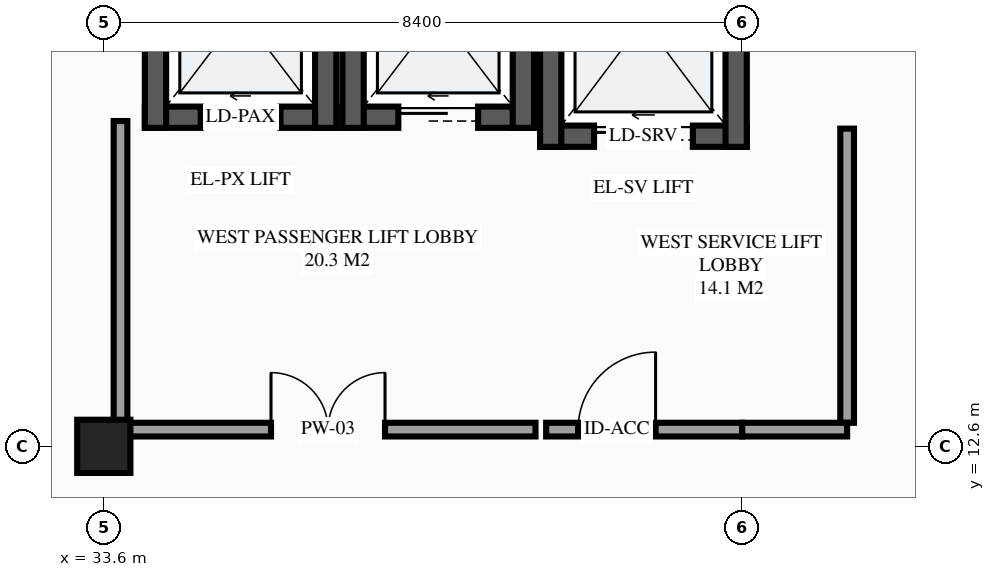
"""IFC4 building model, lengths in metres.
Left out: names, types, materials, properties, quantities, classifications, styles, units other than length and angle.
Written with IfcOpenShell. Run it as: python <this file> out.ifc"""

import sys

from ifc_helpers import new_model, si_unit, direction, frame, frame_2d, origin, origin_2d, place, context, subcontext, project, spatial, rectangle, extrude, element, fill, save


model = new_model("IFC4")
c1 = context("Model", 3, precision=1e-05, world=origin(), true_north=direction((0.0, 1.0)))
c2 = subcontext(c1, "Body", "Model", "MODEL_VIEW")
j1 = project(units=[si_unit("LENGTHUNIT", "METRE"), si_unit("PLANEANGLEUNIT", "RADIAN")], contexts=[c1])
p1 = place(None, origin())
s1 = spatial("IfcSite", under=j1, at=p1, CompositionType="ELEMENT")
p2 = place(p1, origin())
s2 = spatial("IfcBuilding", under=s1, at=p2, CompositionType="ELEMENT")
p3 = place(p2, frame((0.0, 0.0, 14.1)))
s3 = spatial("IfcBuildingStorey", under=s2, at=p3, CompositionType="ELEMENT", Elevation=14.1)
p4 = place(p3, frame((33.6, 12.6, 0.0), z_axis=(0.0, 0.0, 1.0), x_axis=(1.0, 0.0, 0.0)))
e1 = element("IfcColumn", 1, at=p4, inside=s3, PredefinedType="COLUMN", context=c2, shape_type="SweptSolid", body=[
    extrude(rectangle(XDim=0.7, YDim=0.7, at=origin_2d()), origin(), (0.0, 0.0, 1.0), 4.2),
])
p5 = place(p3, frame((34.14, 16.93, 0.0), z_axis=(0.0, 0.0, 1.0), x_axis=(1.0, 0.0, 0.0)))
e2 = element("IfcWall", 2, at=p5, inside=s3, PredefinedType="SHEAR", context=c2, shape_type="SweptSolid", body=[
    extrude(rectangle(XDim=2.52, YDim=0.28, at=frame_2d((1.26, 0.0))), origin(), (0.0, 0.0, 1.0), 4.2),
])
p6 = place(p5, frame((0.735, 0.0, 0.0)))
e3 = element("IfcOpeningElement", 3, at=p6, cuts=e2, PredefinedType="OPENING", context=c2, shape_type="SweptSolid", body=[
    extrude(rectangle(XDim=1.05, YDim=2.2, at=frame_2d((0.525, 1.1))), frame((0.0, 0.15, 0.0), z_axis=(0.0, -1.0, 0.0), x_axis=(1.0, 0.0, 0.0)), (0.0, 0.0, 1.0), 0.3),
])
for number, where, z_axis, x_axis in (
    (4, (36.52, 16.79, 0.0), (0.0, 0.0, 1.0), (0.0, 1.0, 0.0)),
    (5, (34.28, 19.81, 0.0), (0.0, 0.0, 1.0), (0.0, -1.0, 0.0)),
):
    element("IfcWall", number, at=place(p3, frame(where, z_axis=z_axis, x_axis=x_axis)), inside=s3, PredefinedType="SHEAR", context=c2, shape_type="SweptSolid", body=[
        extrude(rectangle(XDim=3.02, YDim=0.28, at=frame_2d((1.51, 0.0))), origin(), (0.0, 0.0, 1.0), 4.2),
    ])
p7 = place(p3, frame((36.74, 16.93, 0.0), z_axis=(0.0, 0.0, 1.0), x_axis=(1.0, 0.0, 0.0)))
e6 = element("IfcWall", 6, at=p7, inside=s3, PredefinedType="SHEAR", context=c2, shape_type="SweptSolid", body=[
    extrude(rectangle(XDim=2.52, YDim=0.28, at=frame_2d((1.26, 0.0))), origin(), (0.0, 0.0, 1.0), 4.2),
])
p8 = place(p7, frame((0.735, 0.0, 0.0)))
e7 = element("IfcOpeningElement", 7, at=p8, cuts=e6, PredefinedType="OPENING", context=c2, shape_type="SweptSolid", body=[
    extrude(rectangle(XDim=1.05, YDim=2.2, at=frame_2d((0.525, 1.1))), frame((0.0, 0.15, 0.0), z_axis=(0.0, -1.0, 0.0), x_axis=(1.0, 0.0, 0.0)), (0.0, 0.0, 1.0), 0.3),
])
for number, where, z_axis, x_axis in (
    (8, (39.12, 16.79, 0.0), (0.0, 0.0, 1.0), (0.0, 1.0, 0.0)),
    (9, (36.88, 19.81, 0.0), (0.0, 0.0, 1.0), (0.0, -1.0, 0.0)),
):
    element("IfcWall", number, at=place(p3, frame(where, z_axis=z_axis, x_axis=x_axis)), inside=s3, PredefinedType="SHEAR", context=c2, shape_type="SweptSolid", body=[
        extrude(rectangle(XDim=3.02, YDim=0.28, at=frame_2d((1.51, 0.0))), origin(), (0.0, 0.0, 1.0), 4.2),
    ])
p9 = place(p3, frame((39.34, 16.68, 0.0), z_axis=(0.0, 0.0, 1.0), x_axis=(1.0, 0.0, 0.0)))
e10 = element("IfcWall", 10, at=p9, inside=s3, PredefinedType="SHEAR", context=c2, shape_type="SweptSolid", body=[
    extrude(rectangle(XDim=2.72, YDim=0.28, at=frame_2d((1.36, 0.0))), origin(), (0.0, 0.0, 1.0), 4.2),
])
p10 = place(p9, frame((0.71, 0.0, 0.0)))
e11 = element("IfcOpeningElement", 11, at=p10, cuts=e10, PredefinedType="OPENING", context=c2, shape_type="SweptSolid", body=[
    extrude(rectangle(XDim=1.3, YDim=2.25, at=frame_2d((0.65, 1.125))), frame((0.0, 0.15, 0.0), z_axis=(0.0, -1.0, 0.0), x_axis=(1.0, 0.0, 0.0)), (0.0, 0.0, 1.0), 0.3),
])
for number, where, z_axis, x_axis in (
    (12, (41.92, 16.54, 0.0), (0.0, 0.0, 1.0), (0.0, 1.0, 0.0)),
    (13, (39.48, 19.86, 0.0), (0.0, 0.0, 1.0), (0.0, -1.0, 0.0)),
):
    element("IfcWall", number, at=place(p3, frame(where, z_axis=z_axis, x_axis=x_axis)), inside=s3, PredefinedType="SHEAR", context=c2, shape_type="SweptSolid", body=[
        extrude(rectangle(XDim=3.32, YDim=0.28, at=frame_2d((1.66, 0.0))), origin(), (0.0, 0.0, 1.0), 4.2),
    ])
p11 = place(p3, frame((33.82, 12.82, 0.0), z_axis=(0.0, 0.0, 1.0), x_axis=(1.0, 0.0, 0.0)))
e14 = element("IfcWall", 14, at=p11, inside=s3, PredefinedType="PARTITIONING", context=c2, shape_type="SweptSolid", body=[
    extrude(rectangle(XDim=5.46, YDim=0.18, at=frame_2d((2.73, 0.0))), origin(), (0.0, 0.0, 1.0), 3.15),
])
p12 = place(p11, frame((1.98, 0.0, 0.0)))
e15 = element("IfcOpeningElement", 15, at=p12, cuts=e14, PredefinedType="OPENING", context=c2, shape_type="SweptSolid", body=[
    extrude(rectangle(XDim=1.5, YDim=2.15, at=frame_2d((0.75, 1.075))), frame((0.0, 0.1, 0.0), z_axis=(0.0, -1.0, 0.0), x_axis=(1.0, 0.0, 0.0)), (0.0, 0.0, 1.0), 0.2),
])
p13 = place(p3, frame((33.82, 12.91, 0.0), z_axis=(0.0, 0.0, 1.0), x_axis=(0.0, 1.0, 0.0)))
e16 = element("IfcWall", 16, at=p13, inside=s3, PredefinedType="PARTITIONING", context=c2, shape_type="SweptSolid", body=[
    extrude(rectangle(XDim=3.97, YDim=0.18, at=frame_2d((1.985, 0.0))), origin(), (0.0, 0.0, 1.0), 3.05),
])
p14 = place(p3, frame((39.42, 12.82, 0.0), z_axis=(0.0, 0.0, 1.0), x_axis=(1.0, 0.0, 0.0)))
e17 = element("IfcWall", 17, at=p14, inside=s3, PredefinedType="PARTITIONING", context=c2, shape_type="SweptSolid", body=[
    extrude(rectangle(XDim=2.58, YDim=0.18, at=frame_2d((1.29, 0.0))), origin(), (0.0, 0.0, 1.0), 3.15),
])
p15 = place(p14, frame((0.42, 0.0, 0.0)))
e18 = element("IfcOpeningElement", 18, at=p15, cuts=e17, PredefinedType="OPENING", context=c2, shape_type="SweptSolid", body=[
    extrude(rectangle(XDim=1.02, YDim=2.15, at=frame_2d((0.51, 1.075))), frame((0.0, 0.1, 0.0), z_axis=(0.0, -1.0, 0.0), x_axis=(1.0, 0.0, 0.0)), (0.0, 0.0, 1.0), 0.2),
])
p16 = place(p3, frame((43.38, 12.91, 0.0), z_axis=(0.0, 0.0, 1.0), x_axis=(0.0, 1.0, 0.0)))
e19 = element("IfcWall", 19, at=p16, inside=s3, PredefinedType="PARTITIONING", context=c2, shape_type="SweptSolid", body=[
    extrude(rectangle(XDim=3.87, YDim=0.18, at=frame_2d((1.935, 0.0))), origin(), (0.0, 0.0, 1.0), 3.895),
])
p17 = place(p3, frame((42.0, 12.82, 0.0), z_axis=(0.0, 0.0, 1.0), x_axis=(1.0, 0.0, 0.0)))
e20 = element("IfcWall", 20, at=p17, inside=s3, PredefinedType="PARTITIONING", context=c2, shape_type="SweptSolid", body=[
    extrude(rectangle(XDim=1.38, YDim=0.18, at=frame_2d((0.69, 0.0))), origin(), (0.0, 0.0, 1.0), 3.25),
])
p18 = place(p6, origin())
e21 = element("IfcDoor", 21, at=p18, inside=s3, OperationType="SLIDING_TO_LEFT", PredefinedType="DOOR", context=c2, shape_type="SweptSolid", body=[
    extrude(rectangle(XDim=1.05, YDim=2.2, at=frame_2d((0.525, 1.1))), frame((0.0, 0.025, 0.0), z_axis=(0.0, -1.0, 0.0), x_axis=(1.0, 0.0, 0.0)), (0.0, 0.0, 1.0), 0.05),
])
fill(e3, e21)
p19 = place(p8, origin())
e22 = element("IfcDoor", 22, at=p19, inside=s3, OperationType="SLIDING_TO_LEFT", PredefinedType="DOOR", context=c2, shape_type="SweptSolid", body=[
    extrude(rectangle(XDim=1.05, YDim=2.2, at=frame_2d((0.525, 1.1))), frame((0.0, 0.025, 0.0), z_axis=(0.0, -1.0, 0.0), x_axis=(1.0, 0.0, 0.0)), (0.0, 0.0, 1.0), 0.05),
])
fill(e7, e22)
p20 = place(p10, origin())
e23 = element("IfcDoor", 23, at=p20, inside=s3, OperationType="SLIDING_TO_LEFT", PredefinedType="DOOR", context=c2, shape_type="SweptSolid", body=[
    extrude(rectangle(XDim=1.3, YDim=2.25, at=frame_2d((0.65, 1.125))), frame((0.0, 0.025, 0.0), z_axis=(0.0, -1.0, 0.0), x_axis=(1.0, 0.0, 0.0)), (0.0, 0.0, 1.0), 0.05),
])
fill(e11, e23)
p21 = place(p12, origin())
e24 = element("IfcDoor", 24, at=p21, inside=s3, OperationType="DOUBLE_DOOR_SINGLE_SWING", PredefinedType="DOOR", context=c2, shape_type="SweptSolid", body=[
    extrude(rectangle(XDim=1.5, YDim=2.15, at=frame_2d((0.75, 1.075))), frame((0.0, 0.025, 0.0), z_axis=(0.0, -1.0, 0.0), x_axis=(1.0, 0.0, 0.0)), (0.0, 0.0, 1.0), 0.05),
])
fill(e15, e24)
p22 = place(p15, origin())
e25 = element("IfcDoor", 25, at=p22, inside=s3, OperationType="SINGLE_SWING_RIGHT", PredefinedType="DOOR", context=c2, shape_type="SweptSolid", body=[
    extrude(rectangle(XDim=1.02, YDim=2.15, at=frame_2d((0.51, 1.075))), frame((0.0, 0.025, 0.0), z_axis=(0.0, -1.0, 0.0), x_axis=(1.0, 0.0, 0.0)), (0.0, 0.0, 1.0), 0.05),
])
fill(e18, e25)
save(model, sys.argv[1])
